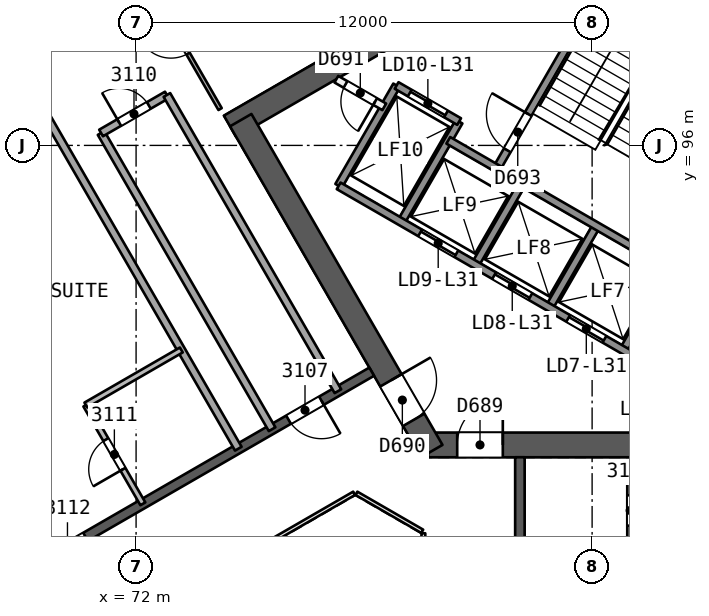
"""IFC4 building model, lengths in metres.
Left out: names, types, materials, properties, quantities, classifications, styles, units other than length and angle.
Written with IfcOpenShell. Run it as: python <this file> out.ifc"""

import sys

from ifc_helpers import new_model, si_unit, direction, frame, frame_2d, origin, place, context, subcontext, project, spatial, rectangle, extrude, element, fill, save


model = new_model("IFC4")
c1 = context("Model", 3, precision=1e-05, world=origin(), true_north=direction((0.0, 1.0)))
c2 = subcontext(c1, "Body", "Model", "MODEL_VIEW")
j1 = project(units=[si_unit("LENGTHUNIT", "METRE"), si_unit("PLANEANGLEUNIT", "RADIAN")], contexts=[c1])
p1 = place(None, origin())
s1 = spatial("IfcSite", under=j1, at=p1, CompositionType="ELEMENT")
p2 = place(p1, origin())
s2 = spatial("IfcBuilding", under=s1, at=p2, CompositionType="ELEMENT")
p3 = place(p2, frame((0.0, 0.0, 129.0)))
s3 = spatial("IfcBuildingStorey", under=s2, at=p3, CompositionType="ELEMENT", Elevation=129.0)
p4 = place(p3, frame((79.688, 88.119, 0.0), z_axis=(0.0, 0.0, 1.0), x_axis=(1.0, 0.0, 0.0)))
e1 = element("IfcWall", 1, at=p4, inside=s3, PredefinedType="SHEAR", context=c2, shape_type="SweptSolid", body=[
    extrude(rectangle(XDim=10.192, YDim=0.65, at=frame_2d((5.096, 0.0))), origin(), (0.0, 0.0, 1.0), 3.7),
])
p5 = place(p4, frame((0.762, 0.0, 0.0)))
e2 = element("IfcOpeningElement", 2, at=p5, cuts=e1, PredefinedType="OPENING", context=c2, shape_type="SweptSolid", body=[
    extrude(rectangle(XDim=1.2, YDim=2.1, at=frame_2d((0.6, 1.05))), frame((0.0, 0.335, 0.0), z_axis=(0.0, -1.0, 0.0), x_axis=(1.0, 0.0, 0.0)), (0.0, 0.0, 1.0), 0.671),
])
p6 = place(p3, frame((86.723, 103.575, 0.0), z_axis=(0.0, 0.0, 1.0), x_axis=(-0.866031824457, -0.499988878904, 0.0)))
e3 = element("IfcWall", 3, at=p6, inside=s3, PredefinedType="SHEAR", context=c2, shape_type="SweptSolid", body=[
    extrude(rectangle(XDim=14.146, YDim=0.65, at=frame_2d((7.073, 0.0))), origin(), (0.0, 0.0, 1.0), 3.7),
])
p7 = place(p3, frame((74.754, 96.665, 0.0), z_axis=(0.0, 0.0, 1.0), x_axis=(0.500011799426, -0.866018591275, 0.0)))
e4 = element("IfcWall", 4, at=p7, inside=s3, PredefinedType="SHEAR", context=c2, shape_type="SweptSolid", body=[
    extrude(rectangle(XDim=10.055, YDim=0.65, at=frame_2d((5.027, 0.0))), origin(), (0.0, 0.0, 1.0), 3.7),
])
p8 = place(p7, frame((7.905, 0.0, 0.0)))
e5 = element("IfcOpeningElement", 5, at=p8, cuts=e4, PredefinedType="OPENING", context=c2, shape_type="SweptSolid", body=[
    extrude(rectangle(XDim=1.2, YDim=2.1, at=frame_2d((0.6, 1.05))), frame((0.0, 0.335, 0.0), z_axis=(0.0, -1.0, 0.0), x_axis=(1.0, 0.0, 0.0)), (0.0, 0.0, 1.0), 0.671),
])
p9 = place(p3, frame((82.1, 72.206, 0.0), z_axis=(0.0, 0.0, 1.0), x_axis=(0.0, 1.0, 0.0)))
e6 = element("IfcWall", 6, at=p9, inside=s3, PredefinedType="SHEAR", context=c2, shape_type="SweptSolid", body=[
    extrude(rectangle(XDim=15.588, YDim=0.25, at=frame_2d((7.794, 0.0))), origin(), (0.0, 0.0, 1.0), 3.25),
])
p10 = place(p9, frame((2.206, 0.0, 0.0)))
e7 = element("IfcOpeningElement", 7, at=p10, cuts=e6, PredefinedType="OPENING", context=c2, shape_type="SweptSolid", body=[
    extrude(rectangle(XDim=1.2, YDim=2.4, at=frame_2d((0.6, 1.2))), frame((0.0, 0.135, 0.0), z_axis=(0.0, -1.0, 0.0), x_axis=(1.0, 0.0, 0.0)), (0.0, 0.0, 1.0), 0.271),
])
p11 = place(p9, frame((8.003, 0.0, 0.0)))
e8 = element("IfcOpeningElement", 8, at=p11, cuts=e6, PredefinedType="OPENING", context=c2, shape_type="SweptSolid", body=[
    extrude(rectangle(XDim=1.1, YDim=2.1, at=frame_2d((0.55, 1.05))), frame((0.0, 0.135, 0.0), z_axis=(0.0, -1.0, 0.0), x_axis=(1.0, 0.0, 0.0)), (0.0, 0.0, 1.0), 0.271),
])
p12 = place(p9, frame((9.871, 0.0, 0.0)))
e9 = element("IfcOpeningElement", 9, at=p12, cuts=e6, PredefinedType="OPENING", context=c2, shape_type="SweptSolid", body=[
    extrude(rectangle(XDim=1.0, YDim=2.1, at=frame_2d((0.5, 1.05))), frame((0.0, 0.135, 0.0), z_axis=(0.0, -1.0, 0.0), x_axis=(1.0, 0.0, 0.0)), (0.0, 0.0, 1.0), 0.271),
])
p13 = place(p3, frame((78.2, 90.046, 0.0), z_axis=(0.0, 0.0, 1.0), x_axis=(-0.866026492143, -0.499998114903, 0.0)))
e10 = element("IfcWall", 10, at=p13, inside=s3, PredefinedType="SHEAR", context=c2, shape_type="SweptSolid", body=[
    extrude(rectangle(XDim=15.588, YDim=0.25, at=frame_2d((7.794, 0.0))), origin(), (0.0, 0.0, 1.0), 3.25),
])
p14 = place(p13, frame((1.527, 0.0, 0.0)))
e11 = element("IfcOpeningElement", 11, at=p14, cuts=e10, PredefinedType="OPENING", context=c2, shape_type="SweptSolid", body=[
    extrude(rectangle(XDim=1.0, YDim=2.1, at=frame_2d((0.5, 1.05))), frame((0.0, 0.135, 0.0), z_axis=(0.0, -1.0, 0.0), x_axis=(1.0, 0.0, 0.0)), (0.0, 0.0, 1.0), 0.271),
])
p15 = place(p13, frame((8.694, 0.0, 0.0)))
e12 = element("IfcOpeningElement", 12, at=p15, cuts=e10, PredefinedType="OPENING", context=c2, shape_type="SweptSolid", body=[
    extrude(rectangle(XDim=1.1, YDim=2.1, at=frame_2d((0.55, 1.05))), frame((0.0, 0.135, 0.0), z_axis=(0.0, -1.0, 0.0), x_axis=(1.0, 0.0, 0.0)), (0.0, 0.0, 1.0), 0.271),
])
p16 = place(p13, frame((13.062, 0.0, 0.0)))
e13 = element("IfcOpeningElement", 13, at=p16, cuts=e10, PredefinedType="OPENING", context=c2, shape_type="SweptSolid", body=[
    extrude(rectangle(XDim=1.0, YDim=2.1, at=frame_2d((0.5, 1.05))), frame((0.0, 0.135, 0.0), z_axis=(0.0, -1.0, 0.0), x_axis=(1.0, 0.0, 0.0)), (0.0, 0.0, 1.0), 0.271),
])
p17 = place(p3, frame((85.0, 87.595, 0.0), z_axis=(0.0, 0.0, 1.0), x_axis=(0.0, -1.0, 0.0)))
e14 = element("IfcWall", 14, at=p17, inside=s3, PredefinedType="PARTITIONING", context=c2, shape_type="SweptSolid", body=[
    extrude(rectangle(XDim=2.401, YDim=0.15, at=frame_2d((1.2, 0.0))), origin(), (0.0, 0.0, 1.0), 3.25),
])
p18 = place(p17, frame((0.801, 0.0, 0.0)))
e15 = element("IfcOpeningElement", 15, at=p18, cuts=e14, PredefinedType="OPENING", context=c2, shape_type="SweptSolid", body=[
    extrude(rectangle(XDim=0.8, YDim=2.1, at=frame_2d((0.4, 1.05))), frame((0.0, 0.085, 0.0), z_axis=(0.0, -1.0, 0.0), x_axis=(1.0, 0.0, 0.0)), (0.0, 0.0, 1.0), 0.171),
])
p19 = place(p3, frame((74.21, 96.956, 0.0), z_axis=(0.0, 0.0, 1.0), x_axis=(-0.49995489152, 0.866051445611, 0.0)))
e16 = element("IfcWall", 16, at=p19, inside=s3, PredefinedType="PARTITIONING", context=c2, shape_type="SweptSolid", body=[
    extrude(rectangle(XDim=4.273, YDim=0.1, at=frame_2d((2.137, 0.0))), origin(), (0.0, 0.0, 1.0), 3.25),
])
p20 = place(p19, frame((1.687, 0.0, 0.0)))
e17 = element("IfcOpeningElement", 17, at=p20, cuts=e16, PredefinedType="OPENING", context=c2, shape_type="SweptSolid", body=[
    extrude(rectangle(XDim=0.9, YDim=2.1, at=frame_2d((0.45, 1.05))), frame((0.0, 0.061, 0.0), z_axis=(0.0, -1.0, 0.0), x_axis=(1.0, 0.0, 0.0)), (0.0, 0.0, 1.0), 0.121),
])
p21 = place(p3, frame((75.579, 88.533, 0.0), z_axis=(0.0, 0.0, 1.0), x_axis=(-0.5000018851, 0.866024315419, 0.0)))
e18 = element("IfcWall", 18, at=p21, inside=s3, PredefinedType="PARTITIONING", context=c2, shape_type="SweptSolid", body=[
    extrude(rectangle(XDim=9.0, YDim=0.2, at=frame_2d((4.5, 0.0))), origin(), (0.0, 0.0, 1.0), 3.25),
])
p22 = place(p3, frame((71.079, 96.327, 0.0), z_axis=(0.0, 0.0, 1.0), x_axis=(0.866041268327, 0.499972520799, 0.0)))
e19 = element("IfcWall", 19, at=p22, inside=s3, PredefinedType="PARTITIONING", context=c2, shape_type="SweptSolid", body=[
    extrude(rectangle(XDim=2.0, YDim=0.2, at=frame_2d((1.0, 0.0))), origin(), (0.0, 0.0, 1.0), 3.25),
])
p23 = place(p22, frame((0.55, 0.0, 0.0)))
e20 = element("IfcOpeningElement", 20, at=p23, cuts=e19, PredefinedType="OPENING", context=c2, shape_type="SweptSolid", body=[
    extrude(rectangle(XDim=0.9, YDim=2.1, at=frame_2d((0.45, 1.05))), frame((0.0, 0.11, 0.0), z_axis=(0.0, -1.0, 0.0), x_axis=(1.0, 0.0, 0.0)), (0.0, 0.0, 1.0), 0.221),
])
p24 = place(p3, frame((72.811, 97.327, 0.0), z_axis=(0.0, 0.0, 1.0), x_axis=(0.5000018851, -0.866024315419, 0.0)))
e21 = element("IfcWall", 21, at=p24, inside=s3, PredefinedType="PARTITIONING", context=c2, shape_type="SweptSolid", body=[
    extrude(rectangle(XDim=9.0, YDim=0.2, at=frame_2d((4.5, 0.0))), origin(), (0.0, 0.0, 1.0), 3.25),
])
p25 = place(p3, frame((68.564, 98.63, 0.0), z_axis=(0.0, 0.0, 1.0), x_axis=(0.499988083099, -0.866032283901, 0.0)))
e22 = element("IfcWall", 22, at=p25, inside=s3, PredefinedType="PARTITIONING", context=c2, shape_type="SweptSolid", body=[
    extrude(rectangle(XDim=12.252, YDim=0.2, at=frame_2d((6.126, 0.0))), origin(), (0.0, 0.0, 1.0), 3.25),
])
p26 = place(p3, frame((72.178, 86.569, 0.0), z_axis=(0.0, 0.0, 1.0), x_axis=(-0.499990139034, 0.866031096941, 0.0)))
e23 = element("IfcWall", 23, at=p26, inside=s3, PredefinedType="PARTITIONING", context=c2, shape_type="SweptSolid", body=[
    extrude(rectangle(XDim=3.0, YDim=0.15, at=frame_2d((1.5, 0.0))), origin(), (0.0, 0.0, 1.0), 3.25),
])
p27 = place(p26, frame((1.05, 0.0, 0.0)))
e24 = element("IfcOpeningElement", 24, at=p27, cuts=e23, PredefinedType="OPENING", context=c2, shape_type="SweptSolid", body=[
    extrude(rectangle(XDim=0.9, YDim=2.1, at=frame_2d((0.45, 1.05))), frame((0.0, 0.085, 0.0), z_axis=(0.0, -1.0, 0.0), x_axis=(1.0, 0.0, 0.0)), (0.0, 0.0, 1.0), 0.171),
])
p28 = place(p3, frame((70.678, 89.167, 0.0), z_axis=(0.0, 0.0, 1.0), x_axis=(0.866032775405, 0.499987231761, 0.0)))
e25 = element("IfcWall", 25, at=p28, inside=s3, PredefinedType="PARTITIONING", context=c2, shape_type="SweptSolid", body=[
    extrude(rectangle(XDim=2.9, YDim=0.15, at=frame_2d((1.45, 0.0))), origin(), (0.0, 0.0, 1.0), 3.25),
])
p29 = place(p3, frame((40.967, 82.869, 0.0), z_axis=(0.0, 0.0, 1.0), x_axis=(0.86602616217, 0.499998686435, 0.0)))
e26 = element("IfcWall", 26, at=p29, inside=s3, PredefinedType="SOLIDWALL", context=c2, shape_type="SweptSolid", body=[
    extrude(rectangle(XDim=56.079, YDim=0.3, at=frame_2d((28.04, 0.0))), origin(), (0.0, 0.0, 1.0), 3.25),
])
p30 = place(p29, frame((26.839, 0.0, 0.0)))
e27 = element("IfcOpeningElement", 27, at=p30, cuts=e26, PredefinedType="OPENING", context=c2, shape_type="SweptSolid", body=[
    extrude(rectangle(XDim=2.4, YDim=2.4, at=frame_2d((1.2, 1.2))), frame((0.0, 0.161, 0.0), z_axis=(0.0, -1.0, 0.0), x_axis=(1.0, 0.0, 0.0)), (0.0, 0.0, 1.0), 0.321),
])
p31 = place(p29, frame((32.607, 0.0, 0.0)))
e28 = element("IfcOpeningElement", 28, at=p31, cuts=e26, PredefinedType="OPENING", context=c2, shape_type="SweptSolid", body=[
    extrude(rectangle(XDim=2.4, YDim=2.4, at=frame_2d((1.2, 1.2))), frame((0.0, 0.161, 0.0), z_axis=(0.0, -1.0, 0.0), x_axis=(1.0, 0.0, 0.0)), (0.0, 0.0, 1.0), 0.321),
])
p32 = place(p29, frame((43.547, 0.0, 0.0)))
e29 = element("IfcOpeningElement", 29, at=p32, cuts=e26, PredefinedType="OPENING", context=c2, shape_type="SweptSolid", body=[
    extrude(rectangle(XDim=2.4, YDim=2.4, at=frame_2d((1.2, 1.2))), frame((0.0, 0.161, 0.0), z_axis=(0.0, -1.0, 0.0), x_axis=(1.0, 0.0, 0.0)), (0.0, 0.0, 1.0), 0.321),
])
p33 = place(p29, frame((21.072, 0.0, 0.0)))
e30 = element("IfcOpeningElement", 30, at=p33, cuts=e26, PredefinedType="OPENING", context=c2, shape_type="SweptSolid", body=[
    extrude(rectangle(XDim=2.4, YDim=2.4, at=frame_2d((1.2, 1.2))), frame((0.0, 0.161, 0.0), z_axis=(0.0, -1.0, 0.0), x_axis=(1.0, 0.0, 0.0)), (0.0, 0.0, 1.0), 0.321),
])
p34 = place(p29, frame((10.136, 0.0, 0.0)))
e31 = element("IfcOpeningElement", 31, at=p34, cuts=e26, PredefinedType="OPENING", context=c2, shape_type="SweptSolid", body=[
    extrude(rectangle(XDim=2.4, YDim=2.4, at=frame_2d((1.2, 1.2))), frame((0.0, 0.161, 0.0), z_axis=(0.0, -1.0, 0.0), x_axis=(1.0, 0.0, 0.0)), (0.0, 0.0, 1.0), 0.321),
])
for number, where, z_axis, x_axis in (
    (32, (84.821, 90.611, 0.0), (0.0, 0.0, 1.0), (0.5, 0.866, 0.0)),
    (33, (82.873, 91.736, 0.0), (0.0, 0.0, 1.0), (0.5, 0.866, 0.0)),
    (34, (80.924, 92.861, 0.0), (0.0, 0.0, 1.0), (0.5, 0.866, 0.0)),
):
    element("IfcWall", number, at=place(p3, frame(where, z_axis=z_axis, x_axis=x_axis)), inside=s3, PredefinedType="SOLIDWALL", context=c2, shape_type="SweptSolid", body=[
        extrude(rectangle(XDim=2.48, YDim=0.2, at=frame_2d((1.24, 0.0))), origin(), (0.0, 0.0, 1.0), 3.25),
    ])
p35 = place(p3, frame((81.493, 95.396, 0.0), z_axis=(0.0, 0.0, 1.0), x_axis=(0.500006057782, 0.866021906294, 0.0)))
e35 = element("IfcWall", 35, at=p35, inside=s3, PredefinedType="SOLIDWALL", context=c2, shape_type="SweptSolid", body=[
    extrude(rectangle(XDim=7.7, YDim=0.2, at=frame_2d((3.85, 0.0))), origin(), (0.0, 0.0, 1.0), 3.25),
])
p36 = place(p35, frame((0.55, 0.0, 0.0)))
e36 = element("IfcOpeningElement", 36, at=p36, cuts=e35, PredefinedType="OPENING", context=c2, shape_type="SweptSolid", body=[
    extrude(rectangle(XDim=1.1, YDim=2.1, at=frame_2d((0.55, 1.05))), frame((0.0, 0.11, 0.0), z_axis=(0.0, -1.0, 0.0), x_axis=(1.0, 0.0, 0.0)), (0.0, 0.0, 1.0), 0.221),
])
for number, where, z_axis, x_axis in (
    (37, (78.976, 93.986, 0.0), (0.0, 0.0, 1.0), (0.5, 0.866, 0.0)),
    (38, (77.33, 94.936, 0.0), (0.0, 0.0, 1.0), (0.5, 0.866, 0.0)),
):
    element("IfcWall", number, at=place(p3, frame(where, z_axis=z_axis, x_axis=x_axis)), inside=s3, PredefinedType="SOLIDWALL", context=c2, shape_type="SweptSolid", body=[
        extrude(rectangle(XDim=3.05, YDim=0.2, at=frame_2d((1.525, 0.0))), origin(), (0.0, 0.0, 1.0), 3.25),
    ])
p37 = place(p3, frame((86.77, 89.486, 0.0), z_axis=(0.0, 0.0, 1.0), x_axis=(-0.86601811187, 0.500012629753, 0.0)))
e39 = element("IfcWall", 39, at=p37, inside=s3, PredefinedType="SOLIDWALL", context=c2, shape_type="SweptSolid", body=[
    extrude(rectangle(XDim=10.9, YDim=0.2, at=frame_2d((5.45, 0.0))), origin(), (0.0, 0.0, 1.0), 3.25),
])
p38 = place(p37, frame((0.575, 0.0, 0.0)))
e40 = element("IfcOpeningElement", 40, at=p38, cuts=e39, PredefinedType="OPENING", context=c2, shape_type="SweptSolid", body=[
    extrude(rectangle(XDim=1.1, YDim=2.1, at=frame_2d((0.55, 1.05))), frame((0.0, 0.11, 0.0), z_axis=(0.0, -1.0, 0.0), x_axis=(1.0, 0.0, 0.0)), (0.0, 0.0, 1.0), 0.221),
])
p39 = place(p37, frame((2.825, 0.0, 0.0)))
e41 = element("IfcOpeningElement", 41, at=p39, cuts=e39, PredefinedType="OPENING", context=c2, shape_type="SweptSolid", body=[
    extrude(rectangle(XDim=1.1, YDim=2.1, at=frame_2d((0.55, 1.05))), frame((0.0, 0.11, 0.0), z_axis=(0.0, -1.0, 0.0), x_axis=(1.0, 0.0, 0.0)), (0.0, 0.0, 1.0), 0.221),
])
p40 = place(p37, frame((5.075, 0.0, 0.0)))
e42 = element("IfcOpeningElement", 42, at=p40, cuts=e39, PredefinedType="OPENING", context=c2, shape_type="SweptSolid", body=[
    extrude(rectangle(XDim=1.1, YDim=2.1, at=frame_2d((0.55, 1.05))), frame((0.0, 0.11, 0.0), z_axis=(0.0, -1.0, 0.0), x_axis=(1.0, 0.0, 0.0)), (0.0, 0.0, 1.0), 0.221),
])
p41 = place(p37, frame((7.325, 0.0, 0.0)))
e43 = element("IfcOpeningElement", 43, at=p41, cuts=e39, PredefinedType="OPENING", context=c2, shape_type="SweptSolid", body=[
    extrude(rectangle(XDim=1.1, YDim=2.1, at=frame_2d((0.55, 1.05))), frame((0.0, 0.11, 0.0), z_axis=(0.0, -1.0, 0.0), x_axis=(1.0, 0.0, 0.0)), (0.0, 0.0, 1.0), 0.221),
])
p42 = place(p3, frame((78.53, 97.014, 0.0), z_axis=(0.0, 0.0, 1.0), x_axis=(-0.866045896294, 0.499964504253, 0.0)))
e44 = element("IfcWall", 44, at=p42, inside=s3, PredefinedType="PARTITIONING", context=c2, shape_type="SweptSolid", body=[
    extrude(rectangle(XDim=1.455, YDim=0.2, at=frame_2d((0.728, 0.0))), origin(), (0.0, 0.0, 1.0), 3.25),
])
p43 = place(p42, frame((0.278, 0.0, 0.0)))
e45 = element("IfcOpeningElement", 45, at=p43, cuts=e44, PredefinedType="OPENING", context=c2, shape_type="SweptSolid", body=[
    extrude(rectangle(XDim=0.9, YDim=2.1, at=frame_2d((0.45, 1.05))), frame((0.0, 0.11, 0.0), z_axis=(0.0, -1.0, 0.0), x_axis=(1.0, 0.0, 0.0)), (0.0, 0.0, 1.0), 0.221),
])
p44 = place(p3, frame((88.01, 91.634, 0.0), z_axis=(0.0, 0.0, 1.0), x_axis=(-0.866024315419, 0.5000018851, 0.0)))
e46 = element("IfcWall", 46, at=p44, inside=s3, PredefinedType="SOLIDWALL", context=c2, shape_type="SweptSolid", body=[
    extrude(rectangle(XDim=9.0, YDim=0.2, at=frame_2d((4.5, 0.0))), origin(), (0.0, 0.0, 1.0), 3.25),
])
p45 = place(p3, frame((80.5, 96.627, 0.0), z_axis=(0.0, 0.0, 1.0), x_axis=(-0.86601224135, 0.500022797313, 0.0)))
e47 = element("IfcWall", 47, at=p45, inside=s3, PredefinedType="SOLIDWALL", context=c2, shape_type="SweptSolid", body=[
    extrude(rectangle(XDim=1.9, YDim=0.2, at=frame_2d((0.95, 0.0))), origin(), (0.0, 0.0, 1.0), 3.25),
])
p46 = place(p45, frame((0.4, 0.0, 0.0)))
e48 = element("IfcOpeningElement", 48, at=p46, cuts=e47, PredefinedType="OPENING", context=c2, shape_type="SweptSolid", body=[
    extrude(rectangle(XDim=1.1, YDim=2.1, at=frame_2d((0.55, 1.05))), frame((0.0, 0.11, 0.0), z_axis=(0.0, -1.0, 0.0), x_axis=(1.0, 0.0, 0.0)), (0.0, 0.0, 1.0), 0.221),
])
p47 = place(p3, frame((79.56, 74.206, 0.0), z_axis=(0.0, 0.0, 1.0), x_axis=(0.0, 1.0, 0.0)))
e49 = element("IfcWall", 49, at=p47, inside=s3, PredefinedType="PARTITIONING", context=c2, shape_type="SweptSolid", body=[
    extrude(rectangle(XDim=11.588, YDim=0.1, at=frame_2d((5.794, 0.0))), origin(), (0.0, 0.0, 1.0), 3.25),
])
p48 = place(p3, frame((79.53, 85.846, 0.0), z_axis=(0.0, 0.0, 1.0), x_axis=(-0.866041268327, 0.499972520799, 0.0)))
e50 = element("IfcWall", 50, at=p48, inside=s3, PredefinedType="PARTITIONING", context=c2, shape_type="SweptSolid", body=[
    extrude(rectangle(XDim=2.0, YDim=0.1, at=frame_2d((1.0, 0.0))), origin(), (0.0, 0.0, 1.0), 3.25),
])
p49 = place(p3, frame((77.738, 86.846, 0.0), z_axis=(0.0, 0.0, 1.0), x_axis=(-0.866026658274, -0.499997827154, 0.0)))
e51 = element("IfcWall", 51, at=p49, inside=s3, PredefinedType="PARTITIONING", context=c2, shape_type="SweptSolid", body=[
    extrude(rectangle(XDim=11.588, YDim=0.1, at=frame_2d((5.794, 0.0))), origin(), (0.0, 0.0, 1.0), 3.25),
])
p50 = place(p18, origin())
e52 = element("IfcDoor", 52, at=p50, inside=s3, OperationType="SINGLE_SWING_LEFT", PredefinedType="NOTDEFINED", context=c2, shape_type="SweptSolid", body=[
    extrude(rectangle(XDim=0.8, YDim=2.1, at=frame_2d((0.4, 1.05))), frame((0.0, 0.025, 0.0), z_axis=(0.0, -1.0, 0.0), x_axis=(1.0, 0.0, 0.0)), (0.0, 0.0, 1.0), 0.05),
])
fill(e15, e52)
p51 = place(p14, origin())
e53 = element("IfcDoor", 53, at=p51, inside=s3, OperationType="SINGLE_SWING_LEFT", PredefinedType="NOTDEFINED", context=c2, shape_type="SweptSolid", body=[
    extrude(rectangle(XDim=1.0, YDim=2.1, at=frame_2d((0.5, 1.05))), frame((0.0, 0.025, 0.0), z_axis=(0.0, -1.0, 0.0), x_axis=(1.0, 0.0, 0.0)), (0.0, 0.0, 1.0), 0.05),
])
fill(e11, e53)
p52 = place(p20, origin())
e54 = element("IfcDoor", 54, at=p52, inside=s3, OperationType="SINGLE_SWING_RIGHT", PredefinedType="NOTDEFINED", context=c2, shape_type="SweptSolid", body=[
    extrude(rectangle(XDim=0.9, YDim=2.1, at=frame_2d((0.45, 1.05))), frame((0.0, 0.025, 0.0), z_axis=(0.0, -1.0, 0.0), x_axis=(1.0, 0.0, 0.0)), (0.0, 0.0, 1.0), 0.05),
])
fill(e17, e54)
p53 = place(p23, origin())
e55 = element("IfcDoor", 55, at=p53, inside=s3, OperationType="SINGLE_SWING_LEFT", PredefinedType="NOTDEFINED", context=c2, shape_type="SweptSolid", body=[
    extrude(rectangle(XDim=0.9, YDim=2.1, at=frame_2d((0.45, 1.05))), frame((0.0, 0.025, 0.0), z_axis=(0.0, -1.0, 0.0), x_axis=(1.0, 0.0, 0.0)), (0.0, 0.0, 1.0), 0.05),
])
fill(e20, e55)
p54 = place(p27, origin())
e56 = element("IfcDoor", 56, at=p54, inside=s3, OperationType="SINGLE_SWING_LEFT", PredefinedType="NOTDEFINED", context=c2, shape_type="SweptSolid", body=[
    extrude(rectangle(XDim=0.9, YDim=2.1, at=frame_2d((0.45, 1.05))), frame((0.0, 0.025, 0.0), z_axis=(0.0, -1.0, 0.0), x_axis=(1.0, 0.0, 0.0)), (0.0, 0.0, 1.0), 0.05),
])
fill(e24, e56)
p55 = place(p15, origin())
e57 = element("IfcDoor", 57, at=p55, inside=s3, OperationType="SINGLE_SWING_RIGHT", PredefinedType="NOTDEFINED", context=c2, shape_type="SweptSolid", body=[
    extrude(rectangle(XDim=1.1, YDim=2.1, at=frame_2d((0.55, 1.05))), frame((0.0, 0.025, 0.0), z_axis=(0.0, -1.0, 0.0), x_axis=(1.0, 0.0, 0.0)), (0.0, 0.0, 1.0), 0.05),
])
fill(e12, e57)
p56 = place(p5, origin())
e58 = element("IfcDoor", 58, at=p56, inside=s3, OperationType="SINGLE_SWING_RIGHT", PredefinedType="NOTDEFINED", context=c2, shape_type="SweptSolid", body=[
    extrude(rectangle(XDim=1.2, YDim=2.1, at=frame_2d((0.6, 1.05))), frame((0.0, 0.025, 0.0), z_axis=(0.0, -1.0, 0.0), x_axis=(1.0, 0.0, 0.0)), (0.0, 0.0, 1.0), 0.05),
])
fill(e2, e58)
p57 = place(p8, origin())
e59 = element("IfcDoor", 59, at=p57, inside=s3, OperationType="SINGLE_SWING_LEFT", PredefinedType="NOTDEFINED", context=c2, shape_type="SweptSolid", body=[
    extrude(rectangle(XDim=1.2, YDim=2.1, at=frame_2d((0.6, 1.05))), frame((0.0, 0.025, 0.0), z_axis=(0.0, -1.0, 0.0), x_axis=(1.0, 0.0, 0.0)), (0.0, 0.0, 1.0), 0.05),
])
fill(e5, e59)
p58 = place(p39, origin())
e60 = element("IfcDoor", 60, at=p58, inside=s3, OperationType="SLIDING_TO_LEFT", PredefinedType="NOTDEFINED", context=c2, shape_type="SweptSolid", body=[
    extrude(rectangle(XDim=1.1, YDim=2.1, at=frame_2d((0.55, 1.05))), frame((0.0, 0.025, 0.0), z_axis=(0.0, -1.0, 0.0), x_axis=(1.0, 0.0, 0.0)), (0.0, 0.0, 1.0), 0.05),
])
fill(e41, e60)
p59 = place(p40, origin())
e61 = element("IfcDoor", 61, at=p59, inside=s3, OperationType="SLIDING_TO_RIGHT", PredefinedType="NOTDEFINED", context=c2, shape_type="SweptSolid", body=[
    extrude(rectangle(XDim=1.1, YDim=2.1, at=frame_2d((0.55, 1.05))), frame((0.0, 0.025, 0.0), z_axis=(0.0, -1.0, 0.0), x_axis=(1.0, 0.0, 0.0)), (0.0, 0.0, 1.0), 0.05),
])
fill(e42, e61)
p60 = place(p41, origin())
e62 = element("IfcDoor", 62, at=p60, inside=s3, OperationType="SLIDING_TO_LEFT", PredefinedType="NOTDEFINED", context=c2, shape_type="SweptSolid", body=[
    extrude(rectangle(XDim=1.1, YDim=2.1, at=frame_2d((0.55, 1.05))), frame((0.0, 0.025, 0.0), z_axis=(0.0, -1.0, 0.0), x_axis=(1.0, 0.0, 0.0)), (0.0, 0.0, 1.0), 0.05),
])
fill(e43, e62)
p61 = place(p46, origin())
e63 = element("IfcDoor", 63, at=p61, inside=s3, OperationType="SLIDING_TO_RIGHT", PredefinedType="NOTDEFINED", context=c2, shape_type="SweptSolid", body=[
    extrude(rectangle(XDim=1.1, YDim=2.1, at=frame_2d((0.55, 1.05))), frame((0.0, 0.025, 0.0), z_axis=(0.0, -1.0, 0.0), x_axis=(1.0, 0.0, 0.0)), (0.0, 0.0, 1.0), 0.05),
])
fill(e48, e63)
p62 = place(p43, origin())
e64 = element("IfcDoor", 64, at=p62, inside=s3, OperationType="SINGLE_SWING_LEFT", PredefinedType="NOTDEFINED", context=c2, shape_type="SweptSolid", body=[
    extrude(rectangle(XDim=0.9, YDim=2.1, at=frame_2d((0.45, 1.05))), frame((0.0, 0.025, 0.0), z_axis=(0.0, -1.0, 0.0), x_axis=(1.0, 0.0, 0.0)), (0.0, 0.0, 1.0), 0.05),
])
fill(e45, e64)
p63 = place(p36, origin())
e65 = element("IfcDoor", 65, at=p63, inside=s3, OperationType="SINGLE_SWING_RIGHT", PredefinedType="NOTDEFINED", context=c2, shape_type="SweptSolid", body=[
    extrude(rectangle(XDim=1.1, YDim=2.1, at=frame_2d((0.55, 1.05))), frame((0.0, 0.025, 0.0), z_axis=(0.0, -1.0, 0.0), x_axis=(1.0, 0.0, 0.0)), (0.0, 0.0, 1.0), 0.05),
])
fill(e36, e65)
save(model, sys.argv[1])
